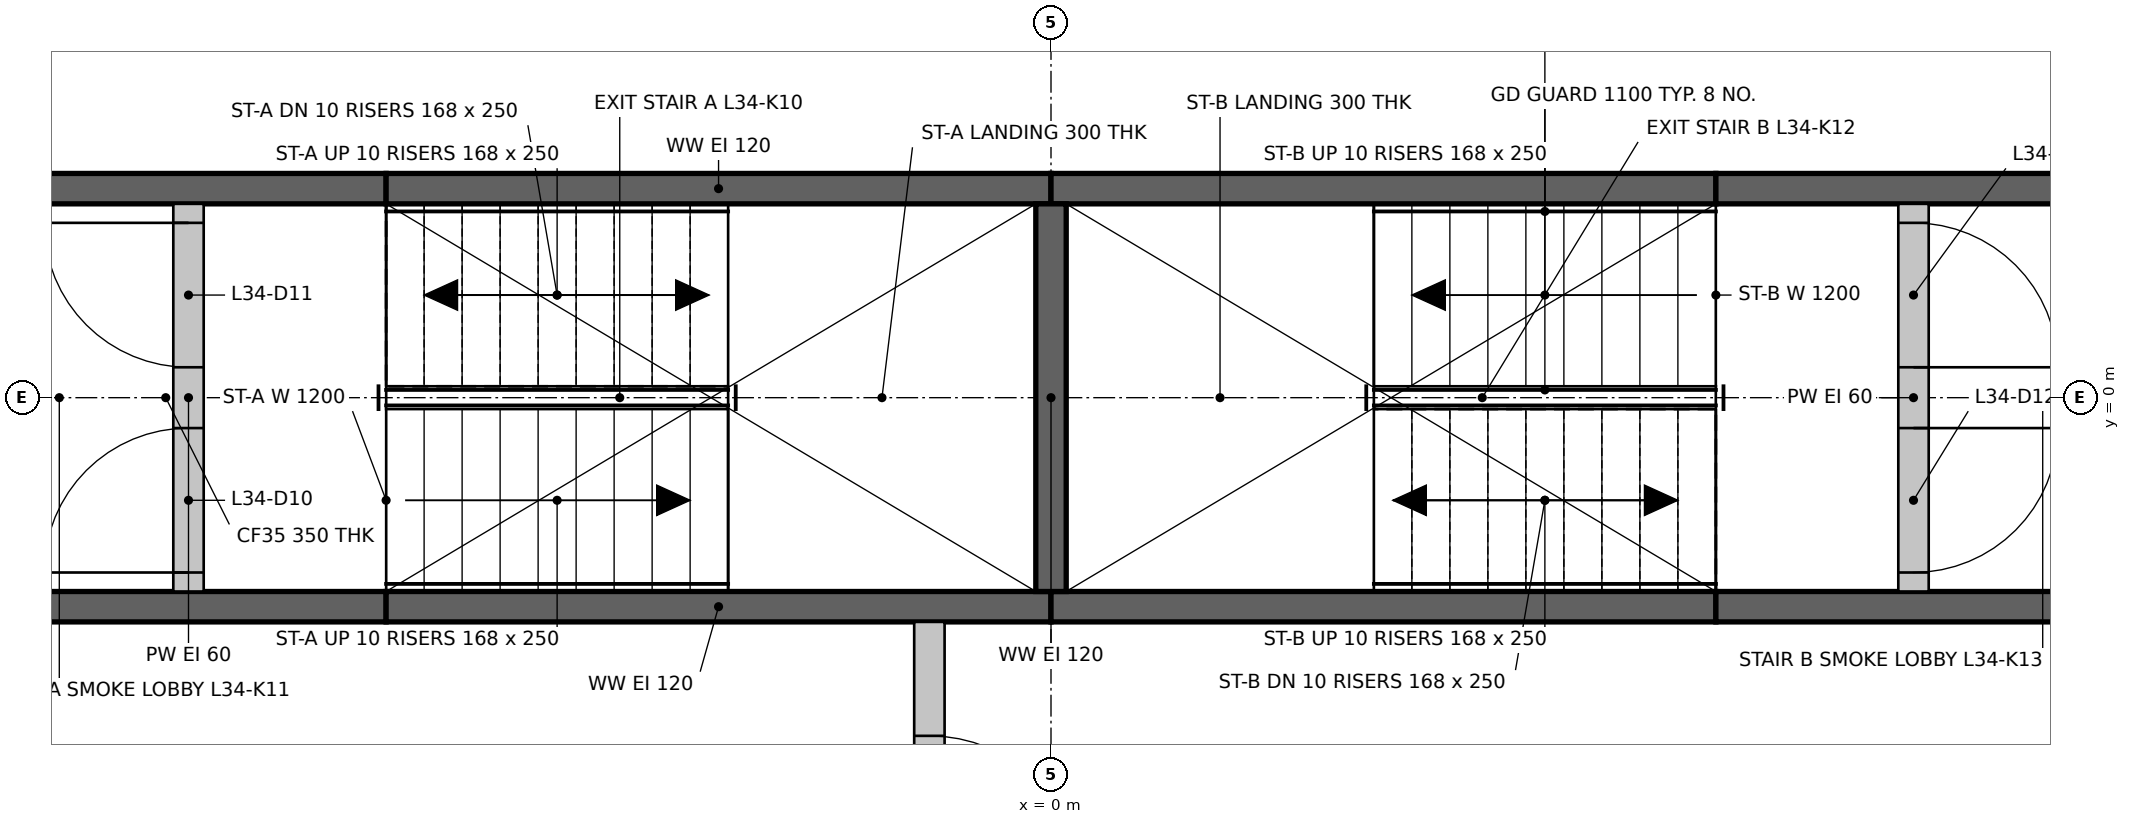
"""IFC4 building model, lengths in metres.
Left out: names, types, materials, properties, quantities, classifications, styles, units other than length and angle.
Written with IfcOpenShell. Run it as: python <this file> out.ifc"""

import sys

from ifc_helpers import new_model, si_unit, direction, frame, frame_2d, origin, place, context, subcontext, project, spatial, rectangle, extrude, element, fill, save


model = new_model("IFC4")
c1 = context("Model", 3, precision=1e-05, world=origin(), true_north=direction((0.0, 1.0)))
c2 = subcontext(c1, "Body", "Model", "MODEL_VIEW")
j1 = project(units=[si_unit("LENGTHUNIT", "METRE"), si_unit("PLANEANGLEUNIT", "RADIAN")], contexts=[c1])
p1 = place(None, origin())
s1 = spatial("IfcSite", under=j1, at=p1, CompositionType="ELEMENT")
p2 = place(p1, origin())
s2 = spatial("IfcBuilding", under=s1, at=p2, CompositionType="ELEMENT")
p3 = place(p2, frame((0.0, 0.0, 137.7)))
s3 = spatial("IfcBuildingStorey", under=s2, at=p3, CompositionType="ELEMENT", Elevation=137.7)
p4 = place(p3, frame((-7.274, -1.375, 0.0), z_axis=(0.0, 0.0, 1.0), x_axis=(1.0, 0.0, 0.0)))
e1 = element("IfcWall", 1, at=p4, inside=s3, PredefinedType="SHEAR", context=c2, shape_type="SweptSolid", body=[
    extrude(rectangle(XDim=2.9, YDim=0.2, at=frame_2d((1.45, 0.0))), origin(), (0.0, 0.0, 1.0), 3.0),
])
for number, where, z_axis, x_axis in (
    (2, (-4.374, -1.375, 0.0), (0.0, 0.0, 1.0), (1.0, 0.0, 0.0)),
    (3, (0.0, -1.375, 0.0), (0.0, 0.0, 1.0), (1.0, 0.0, 0.0)),
):
    element("IfcWall", number, at=place(p3, frame(where, z_axis=z_axis, x_axis=x_axis)), inside=s3, PredefinedType="SHEAR", context=c2, shape_type="SweptSolid", body=[
        extrude(rectangle(XDim=4.374, YDim=0.2, at=frame_2d((2.187, 0.0))), origin(), (0.0, 0.0, 1.0), 3.0),
    ])
for number, where, z_axis, x_axis in (
    (4, (4.374, -1.375, 0.0), (0.0, 0.0, 1.0), (1.0, 0.0, 0.0)),
    (5, (-7.274, 1.375, 0.0), (0.0, 0.0, 1.0), (1.0, 0.0, 0.0)),
):
    element("IfcWall", number, at=place(p3, frame(where, z_axis=z_axis, x_axis=x_axis)), inside=s3, PredefinedType="SHEAR", context=c2, shape_type="SweptSolid", body=[
        extrude(rectangle(XDim=2.9, YDim=0.2, at=frame_2d((1.45, 0.0))), origin(), (0.0, 0.0, 1.0), 3.0),
    ])
for number, where, z_axis, x_axis in (
    (6, (-4.374, 1.375, 0.0), (0.0, 0.0, 1.0), (1.0, 0.0, 0.0)),
    (7, (0.0, 1.375, 0.0), (0.0, 0.0, 1.0), (1.0, 0.0, 0.0)),
):
    element("IfcWall", number, at=place(p3, frame(where, z_axis=z_axis, x_axis=x_axis)), inside=s3, PredefinedType="SHEAR", context=c2, shape_type="SweptSolid", body=[
        extrude(rectangle(XDim=4.374, YDim=0.2, at=frame_2d((2.187, 0.0))), origin(), (0.0, 0.0, 1.0), 3.0),
    ])
p5 = place(p3, frame((4.374, 1.375, 0.0), z_axis=(0.0, 0.0, 1.0), x_axis=(1.0, 0.0, 0.0)))
e8 = element("IfcWall", 8, at=p5, inside=s3, PredefinedType="SHEAR", context=c2, shape_type="SweptSolid", body=[
    extrude(rectangle(XDim=2.9, YDim=0.2, at=frame_2d((1.45, 0.0))), origin(), (0.0, 0.0, 1.0), 3.0),
])
p6 = place(p3, frame((0.0, -1.275, 0.0), z_axis=(0.0, 0.0, 1.0), x_axis=(0.0, 1.0, 0.0)))
e9 = element("IfcWall", 9, at=p6, inside=s3, PredefinedType="SHEAR", context=c2, shape_type="SweptSolid", body=[
    extrude(rectangle(XDim=2.55, YDim=0.2, at=frame_2d((1.275, 0.0))), origin(), (0.0, 0.0, 1.0), 3.0),
])
p7 = place(p3, frame((-0.8, -3.974, 0.0), z_axis=(0.0, 0.0, 1.0), x_axis=(0.0, 1.0, 0.0)))
e10 = element("IfcWall", 10, at=p7, inside=s3, PredefinedType="PARTITIONING", context=c2, shape_type="SweptSolid", body=[
    extrude(rectangle(XDim=2.499, YDim=0.2, at=frame_2d((1.25, 0.0))), origin(), (0.0, 0.0, 1.0), 3.0),
])
p8 = place(p7, frame((0.75, 0.0, 0.0)))
e11 = element("IfcOpeningElement", 11, at=p8, cuts=e10, PredefinedType="OPENING", context=c2, shape_type="SweptSolid", body=[
    extrude(rectangle(XDim=1.0, YDim=2.1, at=frame_2d((0.5, 1.05))), frame((0.0, 0.11, 0.0), z_axis=(0.0, -1.0, 0.0), x_axis=(1.0, 0.0, 0.0)), (0.0, 0.0, 1.0), 0.22),
])
p9 = place(p3, frame((-5.674, -1.275, 0.0), z_axis=(0.0, 0.0, 1.0), x_axis=(0.0, 1.0, 0.0)))
e12 = element("IfcWall", 12, at=p9, inside=s3, PredefinedType="PARTITIONING", context=c2, shape_type="SweptSolid", body=[
    extrude(rectangle(XDim=2.55, YDim=0.2, at=frame_2d((1.275, 0.0))), origin(), (0.0, 0.0, 1.0), 3.0),
])
p10 = place(p9, frame((0.125, 0.0, 0.0)))
e13 = element("IfcOpeningElement", 13, at=p10, cuts=e12, PredefinedType="OPENING", context=c2, shape_type="SweptSolid", body=[
    extrude(rectangle(XDim=0.95, YDim=2.1, at=frame_2d((0.475, 1.05))), frame((0.0, 0.11, 0.0), z_axis=(0.0, -1.0, 0.0), x_axis=(1.0, 0.0, 0.0)), (0.0, 0.0, 1.0), 0.22),
])
p11 = place(p9, frame((1.475, 0.0, 0.0)))
e14 = element("IfcOpeningElement", 14, at=p11, cuts=e12, PredefinedType="OPENING", context=c2, shape_type="SweptSolid", body=[
    extrude(rectangle(XDim=0.95, YDim=2.1, at=frame_2d((0.475, 1.05))), frame((0.0, 0.11, 0.0), z_axis=(0.0, -1.0, 0.0), x_axis=(1.0, 0.0, 0.0)), (0.0, 0.0, 1.0), 0.22),
])
p12 = place(p3, frame((5.674, -1.275, 0.0), z_axis=(0.0, 0.0, 1.0), x_axis=(0.0, 1.0, 0.0)))
e15 = element("IfcWall", 15, at=p12, inside=s3, PredefinedType="PARTITIONING", context=c2, shape_type="SweptSolid", body=[
    extrude(rectangle(XDim=2.55, YDim=0.2, at=frame_2d((1.275, 0.0))), origin(), (0.0, 0.0, 1.0), 3.0),
])
p13 = place(p12, frame((0.125, 0.0, 0.0)))
e16 = element("IfcOpeningElement", 16, at=p13, cuts=e15, PredefinedType="OPENING", context=c2, shape_type="SweptSolid", body=[
    extrude(rectangle(XDim=0.95, YDim=2.1, at=frame_2d((0.475, 1.05))), frame((0.0, 0.11, 0.0), z_axis=(0.0, -1.0, 0.0), x_axis=(1.0, 0.0, 0.0)), (0.0, 0.0, 1.0), 0.22),
])
p14 = place(p12, frame((1.475, 0.0, 0.0)))
e17 = element("IfcOpeningElement", 17, at=p14, cuts=e15, PredefinedType="OPENING", context=c2, shape_type="SweptSolid", body=[
    extrude(rectangle(XDim=0.95, YDim=2.1, at=frame_2d((0.475, 1.05))), frame((0.0, 0.11, 0.0), z_axis=(0.0, -1.0, 0.0), x_axis=(1.0, 0.0, 0.0)), (0.0, 0.0, 1.0), 0.22),
])
p15 = place(p10, origin())
e18 = element("IfcDoor", 18, at=p15, inside=s3, OperationType="SINGLE_SWING_LEFT", PredefinedType="DOOR", context=c2, shape_type="SweptSolid", body=[
    extrude(rectangle(XDim=0.95, YDim=2.1, at=frame_2d((0.475, 1.05))), frame((0.0, 0.025, 0.0), z_axis=(0.0, -1.0, 0.0), x_axis=(1.0, 0.0, 0.0)), (0.0, 0.0, 1.0), 0.05),
])
fill(e13, e18)
p16 = place(p11, origin())
e19 = element("IfcDoor", 19, at=p16, inside=s3, OperationType="SINGLE_SWING_RIGHT", PredefinedType="DOOR", context=c2, shape_type="SweptSolid", body=[
    extrude(rectangle(XDim=0.95, YDim=2.1, at=frame_2d((0.475, 1.05))), frame((0.0, 0.025, 0.0), z_axis=(0.0, -1.0, 0.0), x_axis=(1.0, 0.0, 0.0)), (0.0, 0.0, 1.0), 0.05),
])
fill(e14, e19)
p17 = place(p13, frame((0.95, 0.0, 0.0), z_axis=(0.0, 0.0, 1.0), x_axis=(-1.0, 0.0, 0.0)))
e20 = element("IfcDoor", 20, at=p17, inside=s3, OperationType="SINGLE_SWING_RIGHT", PredefinedType="DOOR", context=c2, shape_type="SweptSolid", body=[
    extrude(rectangle(XDim=0.95, YDim=2.1, at=frame_2d((0.475, 1.05))), frame((0.0, 0.025, 0.0), z_axis=(0.0, -1.0, 0.0), x_axis=(1.0, 0.0, 0.0)), (0.0, 0.0, 1.0), 0.05),
])
fill(e16, e20)
p18 = place(p14, frame((0.95, 0.0, 0.0), z_axis=(0.0, 0.0, 1.0), x_axis=(-1.0, 0.0, 0.0)))
e21 = element("IfcDoor", 21, at=p18, inside=s3, OperationType="SINGLE_SWING_LEFT", PredefinedType="DOOR", context=c2, shape_type="SweptSolid", body=[
    extrude(rectangle(XDim=0.95, YDim=2.1, at=frame_2d((0.475, 1.05))), frame((0.0, 0.025, 0.0), z_axis=(0.0, -1.0, 0.0), x_axis=(1.0, 0.0, 0.0)), (0.0, 0.0, 1.0), 0.05),
])
fill(e17, e21)
p19 = place(p8, frame((1.0, 0.0, 0.0), z_axis=(0.0, 0.0, 1.0), x_axis=(-1.0, 0.0, 0.0)))
e22 = element("IfcDoor", 22, at=p19, inside=s3, OperationType="SINGLE_SWING_LEFT", PredefinedType="DOOR", context=c2, shape_type="SweptSolid", body=[
    extrude(rectangle(XDim=1.0, YDim=2.1, at=frame_2d((0.5, 1.05))), frame((0.0, 0.025, 0.0), z_axis=(0.0, -1.0, 0.0), x_axis=(1.0, 0.0, 0.0)), (0.0, 0.0, 1.0), 0.05),
])
fill(e11, e22)
save(model, sys.argv[1])
